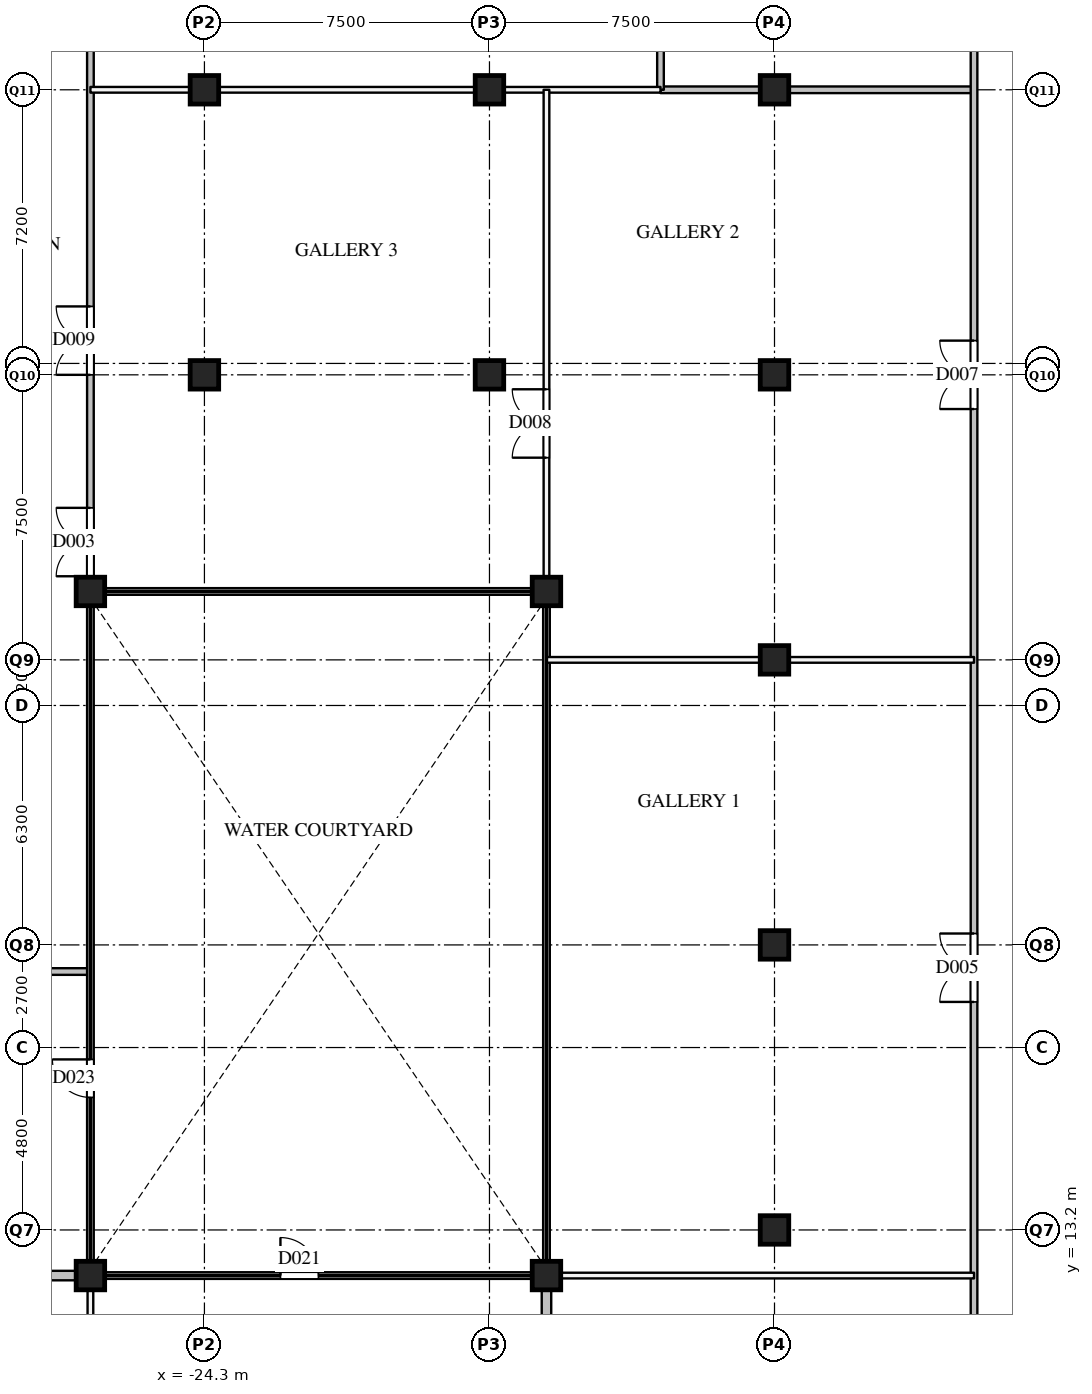
"""IFC4 building model, lengths in metres.
Left out: names, types, materials, properties, quantities, classifications, styles, units other than length and angle.
Written with IfcOpenShell. Run it as: python <this file> out.ifc"""

import sys

from ifc_helpers import new_model, si_unit, direction, frame, frame_2d, origin, origin_2d, place, context, subcontext, project, spatial, rectangle, extrude, element, fill, save


model = new_model("IFC4")
c1 = context("Model", 3, precision=1e-05, world=origin(), true_north=direction((0.0, 1.0)))
c2 = subcontext(c1, "Body", "Model", "MODEL_VIEW")
j1 = project(units=[si_unit("LENGTHUNIT", "METRE"), si_unit("PLANEANGLEUNIT", "RADIAN")], contexts=[c1])
p1 = place(None, origin())
s1 = spatial("IfcSite", under=j1, at=p1, CompositionType="ELEMENT")
p2 = place(p1, origin())
s2 = spatial("IfcBuilding", under=s1, at=p2, CompositionType="ELEMENT")
p3 = place(p2, origin())
s3 = spatial("IfcBuildingStorey", under=s2, at=p3, CompositionType="ELEMENT", Elevation=0.0)
for number, where, z_axis, x_axis in (
    (1, (-24.3, 35.7, 0.0), (0.0, 0.0, 1.0), (1.0, 0.0, 0.0)),
    (2, (-24.3, 43.2, 0.0), (0.0, 0.0, 1.0), (1.0, 0.0, 0.0)),
    (3, (-16.8, 35.7, 0.0), (0.0, 0.0, 1.0), (1.0, 0.0, 0.0)),
    (4, (-16.8, 43.2, 0.0), (0.0, 0.0, 1.0), (1.0, 0.0, 0.0)),
    (5, (-9.3, 13.2, 0.0), (0.0, 0.0, 1.0), (1.0, 0.0, 0.0)),
    (6, (-9.3, 20.7, 0.0), (0.0, 0.0, 1.0), (1.0, 0.0, 0.0)),
    (7, (-9.3, 28.2, 0.0), (0.0, 0.0, 1.0), (1.0, 0.0, 0.0)),
    (8, (-9.3, 35.7, 0.0), (0.0, 0.0, 1.0), (1.0, 0.0, 0.0)),
    (9, (-9.3, 43.2, 0.0), (0.0, 0.0, 1.0), (1.0, 0.0, 0.0)),
    (10, (-27.3, 12.0, 0.0), (0.0, 0.0, 1.0), (1.0, 0.0, 0.0)),
    (11, (-15.3, 12.0, 0.0), (0.0, 0.0, 1.0), (1.0, 0.0, 0.0)),
    (12, (-15.3, 30.0, 0.0), (0.0, 0.0, 1.0), (1.0, 0.0, 0.0)),
    (13, (-27.3, 30.0, 0.0), (0.0, 0.0, 1.0), (1.0, 0.0, 0.0)),
):
    element("IfcColumn", number, at=place(p3, frame(where, z_axis=z_axis, x_axis=x_axis)), inside=s3, PredefinedType="COLUMN", context=c2, shape_type="SweptSolid", body=[
        extrude(rectangle(XDim=0.75, YDim=0.75, at=origin_2d()), origin(), (0.0, 0.0, 1.0), 8.0),
    ])
p4 = place(p3, frame((-27.3, 12.0, 0.0), z_axis=(0.0, 0.0, 1.0), x_axis=(1.0, 0.0, 0.0)))
e14 = element("IfcWall", 14, at=p4, inside=s3, PredefinedType="PARTITIONING", context=c2, shape_type="SweptSolid", body=[
    extrude(rectangle(XDim=12.0, YDim=0.175, at=frame_2d((6.0, 0.0))), origin(), (0.0, 0.0, 1.0), 7.59),
])
p5 = place(p4, frame((5.0, 0.0, 0.0)))
e15 = element("IfcOpeningElement", 15, at=p5, cuts=e14, PredefinedType="OPENING", context=c2, shape_type="SweptSolid", body=[
    extrude(rectangle(XDim=1.0, YDim=2.1, at=frame_2d((0.5, 1.05))), frame((0.0, 0.097, 0.0), z_axis=(0.0, -1.0, 0.0), x_axis=(1.0, 0.0, 0.0)), (0.0, 0.0, 1.0), 0.195),
])
p6 = place(p3, frame((-30.0, 20.0, 0.0), z_axis=(0.0, 0.0, 1.0), x_axis=(1.0, 0.0, 0.0)))
e16 = element("IfcWall", 16, at=p6, inside=s3, PredefinedType="PARTITIONING", context=c2, shape_type="SweptSolid", body=[
    extrude(rectangle(XDim=2.7, YDim=0.175, at=frame_2d((1.35, 0.0))), origin(), (0.0, 0.0, 1.0), 7.59),
])
p7 = place(p3, frame((-27.3, 30.0, 0.0), z_axis=(0.0, 0.0, 1.0), x_axis=(1.0, 0.0, 0.0)))
e17 = element("IfcWall", 17, at=p7, inside=s3, PredefinedType="PARTITIONING", context=c2, shape_type="SweptSolid", body=[
    extrude(rectangle(XDim=12.0, YDim=0.175, at=frame_2d((6.0, 0.0))), origin(), (0.0, 0.0, 1.0), 7.59),
])
p8 = place(p3, frame((-12.3, 43.2, 0.0), z_axis=(0.0, 0.0, 1.0), x_axis=(1.0, 0.0, 0.0)))
e18 = element("IfcWall", 18, at=p8, inside=s3, PredefinedType="PARTITIONING", context=c2, shape_type="SweptSolid", body=[
    extrude(rectangle(XDim=8.25, YDim=0.175, at=frame_2d((4.125, 0.0))), origin(), (0.0, 0.0, 1.0), 6.79),
])
p9 = place(p3, frame((-27.3, 12.0, 0.0), z_axis=(0.0, 0.0, 1.0), x_axis=(0.0, 1.0, 0.0)))
e19 = element("IfcWall", 19, at=p9, inside=s3, PredefinedType="PARTITIONING", context=c2, shape_type="SweptSolid", body=[
    extrude(rectangle(XDim=35.35, YDim=0.175, at=frame_2d((17.675, 0.0))), origin(), (0.0, 0.0, 1.0), 6.79),
])
p10 = place(p9, frame((18.4, 0.0, 0.0)))
e20 = element("IfcOpeningElement", 20, at=p10, cuts=e19, PredefinedType="OPENING", context=c2, shape_type="SweptSolid", body=[
    extrude(rectangle(XDim=1.8, YDim=2.1, at=frame_2d((0.9, 1.05))), frame((0.0, 0.097, 0.0), z_axis=(0.0, -1.0, 0.0), x_axis=(1.0, 0.0, 0.0)), (0.0, 0.0, 1.0), 0.195),
])
p11 = place(p9, frame((23.7, 0.0, 0.0)))
e21 = element("IfcOpeningElement", 21, at=p11, cuts=e19, PredefinedType="OPENING", context=c2, shape_type="SweptSolid", body=[
    extrude(rectangle(XDim=1.8, YDim=2.1, at=frame_2d((0.9, 1.05))), frame((0.0, 0.097, 0.0), z_axis=(0.0, -1.0, 0.0), x_axis=(1.0, 0.0, 0.0)), (0.0, 0.0, 1.0), 0.195),
])
p12 = place(p9, frame((4.688, 0.0, 0.0)))
e22 = element("IfcOpeningElement", 22, at=p12, cuts=e19, PredefinedType="OPENING", context=c2, shape_type="SweptSolid", body=[
    extrude(rectangle(XDim=1.0, YDim=2.1, at=frame_2d((0.5, 1.05))), frame((0.0, 0.097, 0.0), z_axis=(0.0, -1.0, 0.0), x_axis=(1.0, 0.0, 0.0)), (0.0, 0.0, 1.0), 0.195),
])
p13 = place(p3, frame((-15.3, 12.0, 0.0), z_axis=(0.0, 0.0, 1.0), x_axis=(0.0, 1.0, 0.0)))
e23 = element("IfcWall", 23, at=p13, inside=s3, PredefinedType="PARTITIONING", context=c2, shape_type="SweptSolid", body=[
    extrude(rectangle(XDim=18.0, YDim=0.175, at=frame_2d((9.0, 0.0))), origin(), (0.0, 0.0, 1.0), 7.59),
])
p14 = place(p3, frame((-12.3, 43.2, 0.0), z_axis=(0.0, 0.0, 1.0), x_axis=(0.0, 1.0, 0.0)))
e24 = element("IfcWall", 24, at=p14, inside=s3, PredefinedType="PARTITIONING", context=c2, shape_type="SweptSolid", body=[
    extrude(rectangle(XDim=15.75, YDim=0.175, at=frame_2d((7.875, 0.0))), origin(), (0.0, 0.0, 1.0), 6.79),
])
p15 = place(p14, frame((9.665, 0.0, 0.0)))
e25 = element("IfcOpeningElement", 25, at=p15, cuts=e24, PredefinedType="OPENING", context=c2, shape_type="SweptSolid", body=[
    extrude(rectangle(XDim=1.8, YDim=2.1, at=frame_2d((0.9, 1.05))), frame((0.0, 0.097, 0.0), z_axis=(0.0, -1.0, 0.0), x_axis=(1.0, 0.0, 0.0)), (0.0, 0.0, 1.0), 0.195),
])
p16 = place(p3, frame((-4.05, -4.05, 0.0), z_axis=(0.0, 0.0, 1.0), x_axis=(0.0, 1.0, 0.0)))
e26 = element("IfcWall", 26, at=p16, inside=s3, PredefinedType="PARTITIONING", context=c2, shape_type="SweptSolid", body=[
    extrude(rectangle(XDim=63.0, YDim=0.175, at=frame_2d((31.5, 0.0))), origin(), (0.0, 0.0, 1.0), 6.79),
])
p17 = place(p16, frame((51.535, 0.0, 0.0)))
e27 = element("IfcOpeningElement", 27, at=p17, cuts=e26, PredefinedType="OPENING", context=c2, shape_type="SweptSolid", body=[
    extrude(rectangle(XDim=1.8, YDim=2.1, at=frame_2d((0.9, 1.05))), frame((0.0, 0.097, 0.0), z_axis=(0.0, -1.0, 0.0), x_axis=(1.0, 0.0, 0.0)), (0.0, 0.0, 1.0), 0.195),
])
p18 = place(p16, frame((23.25, 0.0, 0.0)))
e28 = element("IfcOpeningElement", 28, at=p18, cuts=e26, PredefinedType="OPENING", context=c2, shape_type="SweptSolid", body=[
    extrude(rectangle(XDim=1.8, YDim=2.1, at=frame_2d((0.9, 1.05))), frame((0.0, 0.097, 0.0), z_axis=(0.0, -1.0, 0.0), x_axis=(1.0, 0.0, 0.0)), (0.0, 0.0, 1.0), 0.195),
])
p19 = place(p16, frame((38.85, 0.0, 0.0)))
e29 = element("IfcOpeningElement", 29, at=p19, cuts=e26, PredefinedType="OPENING", context=c2, shape_type="SweptSolid", body=[
    extrude(rectangle(XDim=1.8, YDim=2.1, at=frame_2d((0.9, 1.05))), frame((0.0, 0.097, 0.0), z_axis=(0.0, -1.0, 0.0), x_axis=(1.0, 0.0, 0.0)), (0.0, 0.0, 1.0), 0.195),
])
p20 = place(p16, frame((8.625, 0.0, 0.0)))
e30 = element("IfcOpeningElement", 30, at=p20, cuts=e26, PredefinedType="OPENING", context=c2, shape_type="SweptSolid", body=[
    extrude(rectangle(XDim=1.8, YDim=2.1, at=frame_2d((0.9, 1.05))), frame((0.0, 0.097, 0.0), z_axis=(0.0, -1.0, 0.0), x_axis=(1.0, 0.0, 0.0)), (0.0, 0.0, 1.0), 0.195),
])
for number, where, z_axis, x_axis in (
    (31, (-15.3, 12.0, 0.0), (0.0, 0.0, 1.0), (1.0, 0.0, 0.0)),
    (32, (-15.3, 28.2, 0.0), (0.0, 0.0, 1.0), (1.0, 0.0, 0.0)),
):
    element("IfcWall", number, at=place(p3, frame(where, z_axis=z_axis, x_axis=x_axis)), inside=s3, PredefinedType="PARTITIONING", context=c2, shape_type="SweptSolid", body=[
        extrude(rectangle(XDim=11.25, YDim=0.15, at=frame_2d((5.625, 0.0))), origin(), (0.0, 0.0, 1.0), 6.79),
    ])
p21 = place(p3, frame((-27.3, 43.2, 0.0), z_axis=(0.0, 0.0, 1.0), x_axis=(1.0, 0.0, 0.0)))
e33 = element("IfcWall", 33, at=p21, inside=s3, PredefinedType="PARTITIONING", context=c2, shape_type="SweptSolid", body=[
    extrude(rectangle(XDim=15.0, YDim=0.15, at=frame_2d((7.5, 0.0))), origin(), (0.0, 0.0, 1.0), 6.79),
])
p22 = place(p3, frame((-27.3, -9.3, 0.0), z_axis=(0.0, 0.0, 1.0), x_axis=(0.0, 1.0, 0.0)))
e34 = element("IfcWall", 34, at=p22, inside=s3, PredefinedType="PARTITIONING", context=c2, shape_type="SweptSolid", body=[
    extrude(rectangle(XDim=21.3, YDim=0.15, at=frame_2d((10.65, 0.0))), origin(), (0.0, 0.0, 1.0), 6.79),
])
p23 = place(p3, frame((-15.3, 30.0, 0.0), z_axis=(0.0, 0.0, 1.0), x_axis=(0.0, 1.0, 0.0)))
e35 = element("IfcWall", 35, at=p23, inside=s3, PredefinedType="PARTITIONING", context=c2, shape_type="SweptSolid", body=[
    extrude(rectangle(XDim=13.2, YDim=0.15, at=frame_2d((6.6, 0.0))), origin(), (0.0, 0.0, 1.0), 6.79),
])
p24 = place(p23, frame((3.52, 0.0, 0.0)))
e36 = element("IfcOpeningElement", 36, at=p24, cuts=e35, PredefinedType="OPENING", context=c2, shape_type="SweptSolid", body=[
    extrude(rectangle(XDim=1.8, YDim=2.1, at=frame_2d((0.9, 1.05))), frame((0.0, 0.085, 0.0), z_axis=(0.0, -1.0, 0.0), x_axis=(1.0, 0.0, 0.0)), (0.0, 0.0, 1.0), 0.17),
])
p25 = place(p3, frame((-32.55, 12.0, 0.0), z_axis=(0.0, 0.0, 1.0), x_axis=(1.0, 0.0, 0.0)))
e37 = element("IfcWall", 37, at=p25, inside=s3, PredefinedType="PARTITIONING", context=c2, shape_type="SweptSolid", body=[
    extrude(rectangle(XDim=5.25, YDim=0.25, at=frame_2d((2.625, 0.0))), origin(), (0.0, 0.0, 1.0), 6.79),
])
p26 = place(p3, frame((-15.3, -9.3, 0.0), z_axis=(0.0, 0.0, 1.0), x_axis=(0.0, 1.0, 0.0)))
e38 = element("IfcWall", 38, at=p26, inside=s3, PredefinedType="PARTITIONING", context=c2, shape_type="SweptSolid", body=[
    extrude(rectangle(XDim=21.3, YDim=0.25, at=frame_2d((10.65, 0.0))), origin(), (0.0, 0.0, 1.0), 6.79),
])
p27 = place(p10, origin())
e39 = element("IfcDoor", 39, at=p27, inside=s3, OperationType="DOUBLE_DOOR_SINGLE_SWING", PredefinedType="DOOR", context=c2, shape_type="SweptSolid", body=[
    extrude(rectangle(XDim=1.8, YDim=2.1, at=frame_2d((0.9, 1.05))), frame((0.0, 0.025, 0.0), z_axis=(0.0, -1.0, 0.0), x_axis=(1.0, 0.0, 0.0)), (0.0, 0.0, 1.0), 0.05),
])
fill(e20, e39)
p28 = place(p18, origin())
e40 = element("IfcDoor", 40, at=p28, inside=s3, OperationType="DOUBLE_DOOR_SINGLE_SWING", PredefinedType="DOOR", context=c2, shape_type="SweptSolid", body=[
    extrude(rectangle(XDim=1.8, YDim=2.1, at=frame_2d((0.9, 1.05))), frame((0.0, 0.025, 0.0), z_axis=(0.0, -1.0, 0.0), x_axis=(1.0, 0.0, 0.0)), (0.0, 0.0, 1.0), 0.05),
])
fill(e28, e40)
p29 = place(p19, origin())
e41 = element("IfcDoor", 41, at=p29, inside=s3, OperationType="DOUBLE_DOOR_SINGLE_SWING", PredefinedType="DOOR", context=c2, shape_type="SweptSolid", body=[
    extrude(rectangle(XDim=1.8, YDim=2.1, at=frame_2d((0.9, 1.05))), frame((0.0, 0.025, 0.0), z_axis=(0.0, -1.0, 0.0), x_axis=(1.0, 0.0, 0.0)), (0.0, 0.0, 1.0), 0.05),
])
fill(e29, e41)
p30 = place(p24, origin())
e42 = element("IfcDoor", 42, at=p30, inside=s3, OperationType="DOUBLE_DOOR_SINGLE_SWING", PredefinedType="DOOR", context=c2, shape_type="SweptSolid", body=[
    extrude(rectangle(XDim=1.8, YDim=2.1, at=frame_2d((0.9, 1.05))), frame((0.0, 0.025, 0.0), z_axis=(0.0, -1.0, 0.0), x_axis=(1.0, 0.0, 0.0)), (0.0, 0.0, 1.0), 0.05),
])
fill(e36, e42)
p31 = place(p11, origin())
e43 = element("IfcDoor", 43, at=p31, inside=s3, OperationType="DOUBLE_DOOR_SINGLE_SWING", PredefinedType="DOOR", context=c2, shape_type="SweptSolid", body=[
    extrude(rectangle(XDim=1.8, YDim=2.1, at=frame_2d((0.9, 1.05))), frame((0.0, 0.025, 0.0), z_axis=(0.0, -1.0, 0.0), x_axis=(1.0, 0.0, 0.0)), (0.0, 0.0, 1.0), 0.05),
])
fill(e21, e43)
p32 = place(p5, origin())
e44 = element("IfcDoor", 44, at=p32, inside=s3, OperationType="SINGLE_SWING_LEFT", PredefinedType="DOOR", context=c2, shape_type="SweptSolid", body=[
    extrude(rectangle(XDim=1.0, YDim=2.1, at=frame_2d((0.5, 1.05))), frame((0.0, 0.025, 0.0), z_axis=(0.0, -1.0, 0.0), x_axis=(1.0, 0.0, 0.0)), (0.0, 0.0, 1.0), 0.05),
])
fill(e15, e44)
p33 = place(p12, origin())
e45 = element("IfcDoor", 45, at=p33, inside=s3, OperationType="SINGLE_SWING_RIGHT", PredefinedType="DOOR", context=c2, shape_type="SweptSolid", body=[
    extrude(rectangle(XDim=1.0, YDim=2.1, at=frame_2d((0.5, 1.05))), frame((0.0, 0.025, 0.0), z_axis=(0.0, -1.0, 0.0), x_axis=(1.0, 0.0, 0.0)), (0.0, 0.0, 1.0), 0.05),
])
fill(e22, e45)
save(model, sys.argv[1])
